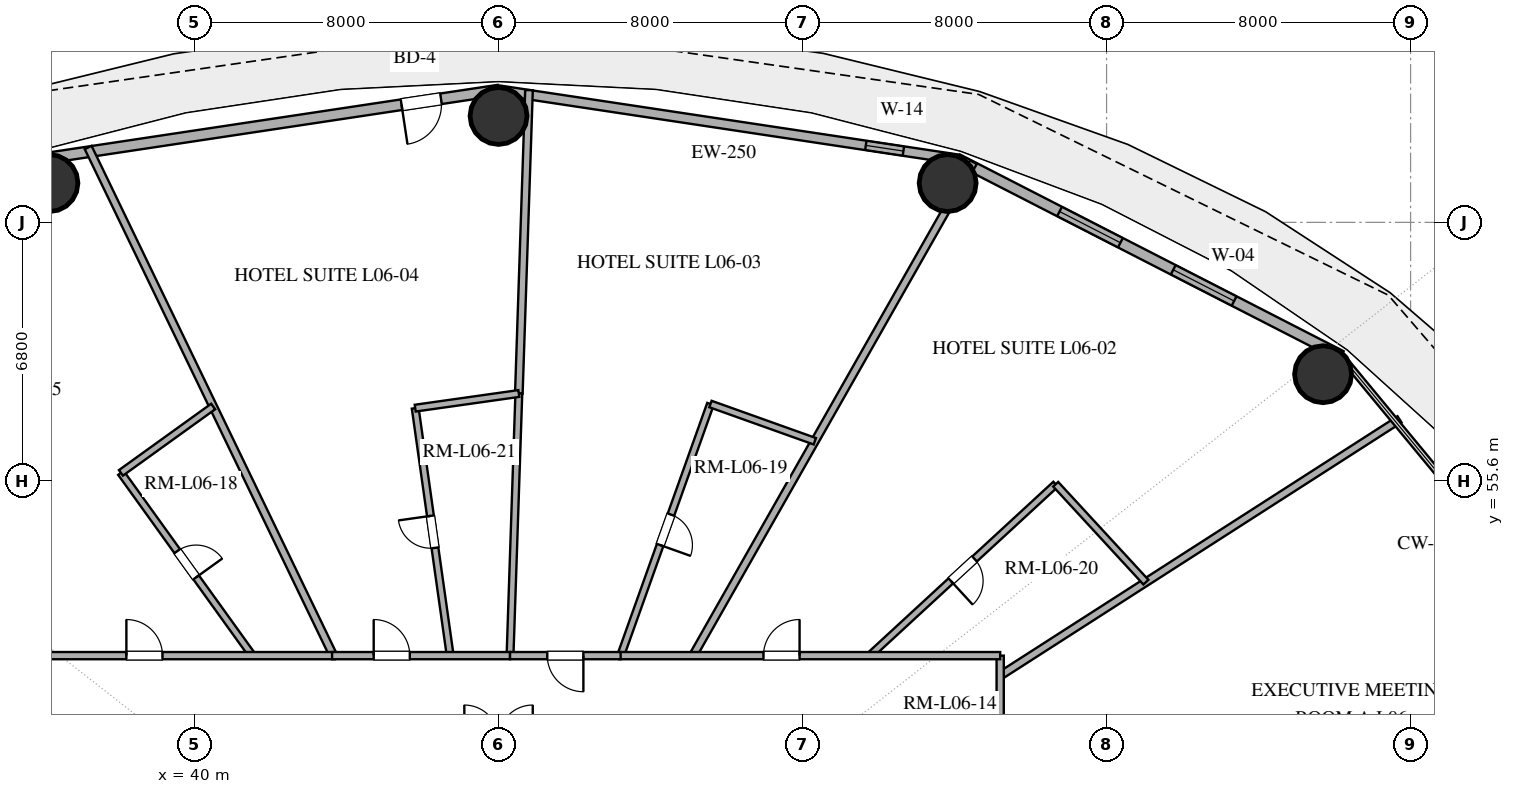
"""IFC4 building model, lengths in metres.
Left out: names, types, materials, properties, quantities, classifications, styles, units other than length and angle.
Written with IfcOpenShell. Run it as: python <this file> out.ifc"""

import sys

from ifc_helpers import new_model, si_unit, direction, frame, frame_2d, origin, origin_2d, place, context, subcontext, project, spatial, rectangle, hollow_circle, extrude, element, fill, save


model = new_model("IFC4")
c1 = context("Model", 3, precision=1e-05, world=origin(), true_north=direction((0.0, 1.0)))
c2 = subcontext(c1, "Body", "Model", "MODEL_VIEW")
j1 = project(units=[si_unit("LENGTHUNIT", "METRE"), si_unit("PLANEANGLEUNIT", "RADIAN")], contexts=[c1])
p1 = place(None, origin())
s1 = spatial("IfcSite", under=j1, at=p1, CompositionType="ELEMENT")
p2 = place(p1, origin())
s2 = spatial("IfcBuilding", under=s1, at=p2, CompositionType="ELEMENT")
p3 = place(p2, frame((0.0, 0.0, 31.8)))
s3 = spatial("IfcBuildingStorey", under=s2, at=p3, CompositionType="ELEMENT", Elevation=31.8)
for number, where, z_axis, x_axis in (
    (1, (69.697, 58.405, 0.0), (0.0, 0.0, 1.0), (1.0, 0.0, 0.0)),
    (2, (59.818, 63.434, 0.0), (0.0, 0.0, 1.0), (1.0, 0.0, 0.0)),
    (3, (48.0, 65.2, 0.0), (0.0, 0.0, 1.0), (1.0, 0.0, 0.0)),
    (4, (36.182, 63.434, 0.0), (0.0, 0.0, 1.0), (1.0, 0.0, 0.0)),
):
    element("IfcColumn", number, at=place(p3, frame(where, z_axis=z_axis, x_axis=x_axis)), inside=s3, PredefinedType="COLUMN", context=c2, shape_type="SweptSolid", body=[
        extrude(hollow_circle(Radius=0.75, WallThickness=0.04, at=origin_2d()), origin(), (0.0, 0.0, 1.0), 3.38),
    ])
p4 = place(p3, frame((70.174, 58.886, 0.0), z_axis=(0.0, 0.0, 1.0), x_axis=(-0.889853976658, 0.456245438581, 0.0)))
e5 = element("IfcWall", 5, at=p4, inside=s3, PredefinedType="SOLIDWALL", context=c2, shape_type="SweptSolid", body=[
    extrude(rectangle(XDim=11.346, YDim=0.28, at=frame_2d((5.673, 0.0))), origin(), (0.0, 0.0, 1.0), 3.38),
])
p5 = place(p4, frame((3.167, 0.0, 0.85)))
e6 = element("IfcOpeningElement", 6, at=p5, cuts=e5, PredefinedType="OPENING", context=c2, shape_type="SweptSolid", body=[
    extrude(rectangle(XDim=1.8, YDim=2.2, at=frame_2d((0.9, 1.1))), frame((0.0, 0.15, 0.0), z_axis=(0.0, -1.0, 0.0), x_axis=(1.0, 0.0, 0.0)), (0.0, 0.0, 1.0), 0.3),
])
p6 = place(p4, frame((6.529, 0.0, 0.85)))
e7 = element("IfcOpeningElement", 7, at=p6, cuts=e5, PredefinedType="OPENING", context=c2, shape_type="SweptSolid", body=[
    extrude(rectangle(XDim=1.8, YDim=2.2, at=frame_2d((0.9, 1.1))), frame((0.0, 0.15, 0.0), z_axis=(0.0, -1.0, 0.0), x_axis=(1.0, 0.0, 0.0)), (0.0, 0.0, 1.0), 0.3),
])
p7 = place(p3, frame((60.078, 64.062, 0.0), z_axis=(0.0, 0.0, 1.0), x_axis=(-0.988864835849, 0.148816452121, 0.0)))
e8 = element("IfcWall", 8, at=p7, inside=s3, PredefinedType="SOLIDWALL", context=c2, shape_type="SweptSolid", body=[
    extrude(rectangle(XDim=12.214, YDim=0.25, at=frame_2d((6.107, 0.0))), origin(), (0.0, 0.0, 1.0), 3.38),
])
p8 = place(p7, frame((1.44, 0.0, 1.42)))
e9 = element("IfcOpeningElement", 9, at=p8, cuts=e8, PredefinedType="OPENING", context=c2, shape_type="SweptSolid", body=[
    extrude(rectangle(XDim=1.0, YDim=1.05, at=frame_2d((0.5, 0.525))), frame((0.0, 0.135, 0.0), z_axis=(0.0, -1.0, 0.0), x_axis=(1.0, 0.0, 0.0)), (0.0, 0.0, 1.0), 0.27),
])
p9 = place(p3, frame((48.0, 65.88, 0.0), z_axis=(0.0, 0.0, 1.0), x_axis=(-0.988864835849, -0.148816452121, 0.0)))
e10 = element("IfcWall", 10, at=p9, inside=s3, PredefinedType="SOLIDWALL", context=c2, shape_type="SweptSolid", body=[
    extrude(rectangle(XDim=12.214, YDim=0.28, at=frame_2d((6.107, 0.0))), origin(), (0.0, 0.0, 1.0), 3.38),
])
p10 = place(p9, frame((1.531, 0.0, 0.0)))
e11 = element("IfcOpeningElement", 11, at=p10, cuts=e10, PredefinedType="OPENING", context=c2, shape_type="SweptSolid", body=[
    extrude(rectangle(XDim=1.05, YDim=2.2, at=frame_2d((0.525, 1.1))), frame((0.0, 0.15, 0.0), z_axis=(0.0, -1.0, 0.0), x_axis=(1.0, 0.0, 0.0)), (0.0, 0.0, 1.0), 0.3),
])
p11 = place(p3, frame((53.116, 51.0, 0.0), z_axis=(0.0, 0.0, 1.0), x_axis=(0.494167535405, 0.869366693031, 0.0)))
e12 = element("IfcWall", 12, at=p11, inside=s3, PredefinedType="PARTITIONING", context=c2, shape_type="SweptSolid", body=[
    extrude(rectangle(XDim=14.934, YDim=0.2, at=frame_2d((7.467, 0.0))), origin(), (0.0, 0.0, 1.0), 2.74),
])
p12 = place(p3, frame((48.802, 65.88, 0.0), z_axis=(0.0, 0.0, 1.0), x_axis=(-0.033562144005, -0.999436632553, 0.0)))
e13 = element("IfcWall", 13, at=p12, inside=s3, PredefinedType="PARTITIONING", context=c2, shape_type="SweptSolid", body=[
    extrude(rectangle(XDim=7.987, YDim=0.2, at=frame_2d((3.994, 0.0))), origin(), (0.0, 0.0, 1.0), 2.74),
])
p13 = place(p3, frame((61.2, 50.472, 0.0), z_axis=(0.0, 0.0, 1.0), x_axis=(0.841576538847, 0.540137879863, 0.0)))
e14 = element("IfcWall", 14, at=p13, inside=s3, PredefinedType="PARTITIONING", context=c2, shape_type="SweptSolid", body=[
    extrude(rectangle(XDim=12.487, YDim=0.2, at=frame_2d((6.244, 0.0))), origin(), (0.0, 0.0, 1.0), 2.74),
])
p14 = place(p3, frame((43.655, 51.0, 0.0), z_axis=(0.0, 0.0, 1.0), x_axis=(-0.434738949034, 0.900556520266, 0.0)))
e15 = element("IfcWall", 15, at=p14, inside=s3, PredefinedType="PARTITIONING", context=c2, shape_type="SweptSolid", body=[
    extrude(rectangle(XDim=14.847, YDim=0.2, at=frame_2d((7.424, 0.0))), origin(), (0.0, 0.0, 1.0), 2.74),
])
p15 = place(p3, frame((61.2, 51.0, 0.0), z_axis=(0.0, 0.0, 1.0), x_axis=(0.0, -1.0, 0.0)))
e16 = element("IfcWall", 16, at=p15, inside=s3, PredefinedType="PARTITIONING", context=c2, shape_type="SweptSolid", body=[
    extrude(rectangle(XDim=14.554, YDim=0.19, at=frame_2d((7.277, 0.0))), origin(), (0.0, 0.0, 1.0), 2.74),
])
p16 = place(p15, frame((3.684, 0.0, 0.0)))
e17 = element("IfcOpeningElement", 17, at=p16, cuts=e16, PredefinedType="OPENING", context=c2, shape_type="SweptSolid", body=[
    extrude(rectangle(XDim=1.0, YDim=2.2, at=frame_2d((0.5, 1.1))), frame((0.0, 0.105, 0.0), z_axis=(0.0, -1.0, 0.0), x_axis=(1.0, 0.0, 0.0)), (0.0, 0.0, 1.0), 0.21),
])
p17 = place(p15, frame((9.438, 0.0, 0.0)))
e18 = element("IfcOpeningElement", 18, at=p17, cuts=e16, PredefinedType="OPENING", context=c2, shape_type="SweptSolid", body=[
    extrude(rectangle(XDim=0.95, YDim=2.15, at=frame_2d((0.475, 1.075))), frame((0.0, 0.105, 0.0), z_axis=(0.0, -1.0, 0.0), x_axis=(1.0, 0.0, 0.0)), (0.0, 0.0, 1.0), 0.21),
])
p18 = place(p3, frame((53.576, 57.621, 0.0), z_axis=(0.0, 0.0, 1.0), x_axis=(-0.336213191961, -0.941785904307, 0.0)))
e19 = element("IfcWall", 19, at=p18, inside=s3, PredefinedType="PLUMBINGWALL", context=c2, shape_type="SweptSolid", body=[
    extrude(rectangle(XDim=7.03, YDim=0.18, at=frame_2d((3.515, 0.0))), origin(), (0.0, 0.0, 1.0), 2.74),
])
p19 = place(p18, frame((3.09, 0.0, 0.0)))
e20 = element("IfcOpeningElement", 20, at=p19, cuts=e19, PredefinedType="OPENING", context=c2, shape_type="SweptSolid", body=[
    extrude(rectangle(XDim=0.85, YDim=2.1, at=frame_2d((0.425, 1.05))), frame((0.0, 0.1, 0.0), z_axis=(0.0, -1.0, 0.0), x_axis=(1.0, 0.0, 0.0)), (0.0, 0.0, 1.0), 0.2),
])
p20 = place(p3, frame((48.534, 57.897, 0.0), z_axis=(0.0, 0.0, 1.0), x_axis=(-0.033537457551, -0.999437461246, 0.0)))
e21 = element("IfcWall", 21, at=p20, inside=s3, PredefinedType="PLUMBINGWALL", context=c2, shape_type="SweptSolid", body=[
    extrude(rectangle(XDim=6.901, YDim=0.18, at=frame_2d((3.451, 0.0))), origin(), (0.0, 0.0, 1.0), 2.74),
])
p21 = place(p3, frame((62.66, 55.51, 0.0), z_axis=(0.0, 0.0, 1.0), x_axis=(-0.735369975398, -0.67766584633, 0.0)))
e22 = element("IfcWall", 22, at=p21, inside=s3, PredefinedType="PLUMBINGWALL", context=c2, shape_type="SweptSolid", body=[
    extrude(rectangle(XDim=6.655, YDim=0.18, at=frame_2d((3.328, 0.0))), origin(), (0.0, 0.0, 1.0), 2.74),
])
p22 = place(p21, frame((2.903, 0.0, 0.0)))
e23 = element("IfcOpeningElement", 23, at=p22, cuts=e22, PredefinedType="OPENING", context=c2, shape_type="SweptSolid", body=[
    extrude(rectangle(XDim=0.85, YDim=2.1, at=frame_2d((0.425, 1.05))), frame((0.0, 0.1, 0.0), z_axis=(0.0, -1.0, 0.0), x_axis=(1.0, 0.0, 0.0)), (0.0, 0.0, 1.0), 0.2),
])
p23 = place(p3, frame((46.728, 51.0, 0.0), z_axis=(0.0, 0.0, 1.0), x_axis=(-0.139991961821, 0.990152640064, 0.0)))
e24 = element("IfcWall", 24, at=p23, inside=s3, PredefinedType="PLUMBINGWALL", context=c2, shape_type="SweptSolid", body=[
    extrude(rectangle(XDim=6.576, YDim=0.18, at=frame_2d((3.288, 0.0))), origin(), (0.0, 0.0, 1.0), 2.74),
])
p24 = place(p23, frame((2.863, 0.0, 0.0)))
e25 = element("IfcOpeningElement", 25, at=p24, cuts=e24, PredefinedType="OPENING", context=c2, shape_type="SweptSolid", body=[
    extrude(rectangle(XDim=0.85, YDim=2.1, at=frame_2d((0.425, 1.05))), frame((0.0, 0.1, 0.0), z_axis=(0.0, -1.0, 0.0), x_axis=(1.0, 0.0, 0.0)), (0.0, 0.0, 1.0), 0.2),
])
p25 = place(p3, frame((38.063, 55.809, 0.0), z_axis=(0.0, 0.0, 1.0), x_axis=(0.584084318507, -0.811692989297, 0.0)))
e26 = element("IfcWall", 26, at=p25, inside=s3, PredefinedType="PLUMBINGWALL", context=c2, shape_type="SweptSolid", body=[
    extrude(rectangle(XDim=5.924, YDim=0.18, at=frame_2d((2.962, 0.0))), origin(), (0.0, 0.0, 1.0), 2.74),
])
p26 = place(p25, frame((2.537, 0.0, 0.0)))
e27 = element("IfcOpeningElement", 27, at=p26, cuts=e26, PredefinedType="OPENING", context=c2, shape_type="SweptSolid", body=[
    extrude(rectangle(XDim=0.85, YDim=2.1, at=frame_2d((0.425, 1.05))), frame((0.0, 0.1, 0.0), z_axis=(0.0, -1.0, 0.0), x_axis=(1.0, 0.0, 0.0)), (0.0, 0.0, 1.0), 0.2),
])
p27 = place(p3, frame((34.8, 51.0, 0.0), z_axis=(0.0, 0.0, 1.0), x_axis=(1.0, 0.0, 0.0)))
e28 = element("IfcWall", 28, at=p27, inside=s3, PredefinedType="PARTITIONING", context=c2, shape_type="SweptSolid", body=[
    extrude(rectangle(XDim=8.891, YDim=0.19, at=frame_2d((4.445, 0.0))), origin(), (0.0, 0.0, 1.0), 2.74),
])
p28 = place(p27, frame((3.407, 0.0, 0.0)))
e29 = element("IfcOpeningElement", 29, at=p28, cuts=e28, PredefinedType="OPENING", context=c2, shape_type="SweptSolid", body=[
    extrude(rectangle(XDim=0.95, YDim=2.15, at=frame_2d((0.475, 1.075))), frame((0.0, 0.105, 0.0), z_axis=(0.0, -1.0, 0.0), x_axis=(1.0, 0.0, 0.0)), (0.0, 0.0, 1.0), 0.21),
])
p29 = place(p3, frame((51.179, 51.0, 0.0), z_axis=(0.0, 0.0, 1.0), x_axis=(1.0, 0.0, 0.0)))
e30 = element("IfcWall", 30, at=p29, inside=s3, PredefinedType="PARTITIONING", context=c2, shape_type="SweptSolid", body=[
    extrude(rectangle(XDim=10.021, YDim=0.19, at=frame_2d((5.01, 0.0))), origin(), (0.0, 0.0, 1.0), 2.74),
])
p30 = place(p29, frame((3.792, 0.0, 0.0)))
e31 = element("IfcOpeningElement", 31, at=p30, cuts=e30, PredefinedType="OPENING", context=c2, shape_type="SweptSolid", body=[
    extrude(rectangle(XDim=0.95, YDim=2.15, at=frame_2d((0.475, 1.075))), frame((0.0, 0.105, 0.0), z_axis=(0.0, -1.0, 0.0), x_axis=(1.0, 0.0, 0.0)), (0.0, 0.0, 1.0), 0.21),
])
p31 = place(p3, frame((65.035, 52.933, 0.0), z_axis=(0.0, 0.0, 1.0), x_axis=(-0.677675106239, 0.735361442002, 0.0)))
e32 = element("IfcWall", 32, at=p31, inside=s3, PredefinedType="PLUMBINGWALL", context=c2, shape_type="SweptSolid", body=[
    extrude(rectangle(XDim=3.504, YDim=0.18, at=frame_2d((1.752, 0.0))), origin(), (0.0, 0.0, 1.0), 2.74),
])
p32 = place(p3, frame((43.62, 51.0, 0.0), z_axis=(0.0, 0.0, 1.0), x_axis=(1.0, 0.0, 0.0)))
e33 = element("IfcWall", 33, at=p32, inside=s3, PredefinedType="PARTITIONING", context=c2, shape_type="SweptSolid", body=[
    extrude(rectangle(XDim=4.683, YDim=0.19, at=frame_2d((2.341, 0.0))), origin(), (0.0, 0.0, 1.0), 2.74),
])
p33 = place(p32, frame((1.095, 0.0, 0.0)))
e34 = element("IfcOpeningElement", 34, at=p33, cuts=e33, PredefinedType="OPENING", context=c2, shape_type="SweptSolid", body=[
    extrude(rectangle(XDim=0.95, YDim=2.15, at=frame_2d((0.475, 1.075))), frame((0.0, 0.105, 0.0), z_axis=(0.0, -1.0, 0.0), x_axis=(1.0, 0.0, 0.0)), (0.0, 0.0, 1.0), 0.21),
])
p34 = place(p3, frame((40.49, 57.555, 0.0), z_axis=(0.0, 0.0, 1.0), x_axis=(-0.811670601443, -0.584115429305, 0.0)))
e35 = element("IfcWall", 35, at=p34, inside=s3, PredefinedType="PLUMBINGWALL", context=c2, shape_type="SweptSolid", body=[
    extrude(rectangle(XDim=2.99, YDim=0.18, at=frame_2d((1.495, 0.0))), origin(), (0.0, 0.0, 1.0), 2.74),
])
p35 = place(p3, frame((56.322, 56.64, 0.0), z_axis=(0.0, 0.0, 1.0), x_axis=(-0.94177979862, 0.336230294457, 0.0)))
e36 = element("IfcWall", 36, at=p35, inside=s3, PredefinedType="PLUMBINGWALL", context=c2, shape_type="SweptSolid", body=[
    extrude(rectangle(XDim=2.915, YDim=0.18, at=frame_2d((1.458, 0.0))), origin(), (0.0, 0.0, 1.0), 2.74),
])
p36 = place(p3, frame((51.213, 51.0, 0.0), z_axis=(0.0, 0.0, 1.0), x_axis=(-1.0, 0.0, 0.0)))
e37 = element("IfcWall", 37, at=p36, inside=s3, PredefinedType="PARTITIONING", context=c2, shape_type="SweptSolid", body=[
    extrude(rectangle(XDim=2.911, YDim=0.19, at=frame_2d((1.455, 0.0))), origin(), (0.0, 0.0, 1.0), 2.74),
])
p37 = place(p36, frame((0.98, 0.0, 0.0)))
e38 = element("IfcOpeningElement", 38, at=p37, cuts=e37, PredefinedType="OPENING", context=c2, shape_type="SweptSolid", body=[
    extrude(rectangle(XDim=0.95, YDim=2.15, at=frame_2d((0.475, 1.075))), frame((0.0, 0.105, 0.0), z_axis=(0.0, -1.0, 0.0), x_axis=(1.0, 0.0, 0.0)), (0.0, 0.0, 1.0), 0.21),
])
p38 = place(p3, frame((45.807, 57.512, 0.0), z_axis=(0.0, 0.0, 1.0), x_axis=(0.990152382036, 0.139993786823, 0.0)))
e39 = element("IfcWall", 39, at=p38, inside=s3, PredefinedType="PLUMBINGWALL", context=c2, shape_type="SweptSolid", body=[
    extrude(rectangle(XDim=2.754, YDim=0.18, at=frame_2d((1.377, 0.0))), origin(), (0.0, 0.0, 1.0), 2.74),
])
p39 = place(p5, origin())
e40 = element("IfcWindow", 40, at=p39, inside=s3, PartitioningType="SINGLE_PANEL", PredefinedType="WINDOW", context=c2, shape_type="SweptSolid", body=[
    extrude(rectangle(XDim=1.8, YDim=2.2, at=frame_2d((0.9, 1.1))), frame((0.0, 0.03, 0.0), z_axis=(0.0, -1.0, 0.0), x_axis=(1.0, 0.0, 0.0)), (0.0, 0.0, 1.0), 0.06),
])
fill(e6, e40)
p40 = place(p6, origin())
e41 = element("IfcWindow", 41, at=p40, inside=s3, PartitioningType="SINGLE_PANEL", PredefinedType="WINDOW", context=c2, shape_type="SweptSolid", body=[
    extrude(rectangle(XDim=1.8, YDim=2.2, at=frame_2d((0.9, 1.1))), frame((0.0, 0.03, 0.0), z_axis=(0.0, -1.0, 0.0), x_axis=(1.0, 0.0, 0.0)), (0.0, 0.0, 1.0), 0.06),
])
fill(e7, e41)
p41 = place(p10, origin())
e42 = element("IfcDoor", 42, at=p41, inside=s3, OperationType="SINGLE_SWING_RIGHT", PredefinedType="DOOR", context=c2, shape_type="SweptSolid", body=[
    extrude(rectangle(XDim=1.05, YDim=2.2, at=frame_2d((0.525, 1.1))), frame((0.0, 0.025, 0.0), z_axis=(0.0, -1.0, 0.0), x_axis=(1.0, 0.0, 0.0)), (0.0, 0.0, 1.0), 0.05),
])
fill(e11, e42)
p42 = place(p8, origin())
e43 = element("IfcWindow", 43, at=p42, inside=s3, PartitioningType="SINGLE_PANEL", PredefinedType="WINDOW", context=c2, shape_type="SweptSolid", body=[
    extrude(rectangle(XDim=1.0, YDim=1.05, at=frame_2d((0.5, 0.525))), frame((0.0, 0.03, 0.0), z_axis=(0.0, -1.0, 0.0), x_axis=(1.0, 0.0, 0.0)), (0.0, 0.0, 1.0), 0.06),
])
fill(e9, e43)
p43 = place(p19, origin())
e44 = element("IfcDoor", 44, at=p43, inside=s3, OperationType="SINGLE_SWING_RIGHT", PredefinedType="DOOR", context=c2, shape_type="SweptSolid", body=[
    extrude(rectangle(XDim=0.85, YDim=2.1, at=frame_2d((0.425, 1.05))), frame((0.0, 0.025, 0.0), z_axis=(0.0, -1.0, 0.0), x_axis=(1.0, 0.0, 0.0)), (0.0, 0.0, 1.0), 0.05),
])
fill(e20, e44)
p44 = place(p22, origin())
e45 = element("IfcDoor", 45, at=p44, inside=s3, OperationType="SINGLE_SWING_RIGHT", PredefinedType="DOOR", context=c2, shape_type="SweptSolid", body=[
    extrude(rectangle(XDim=0.85, YDim=2.1, at=frame_2d((0.425, 1.05))), frame((0.0, 0.025, 0.0), z_axis=(0.0, -1.0, 0.0), x_axis=(1.0, 0.0, 0.0)), (0.0, 0.0, 1.0), 0.05),
])
fill(e23, e45)
p45 = place(p24, origin())
e46 = element("IfcDoor", 46, at=p45, inside=s3, OperationType="SINGLE_SWING_RIGHT", PredefinedType="DOOR", context=c2, shape_type="SweptSolid", body=[
    extrude(rectangle(XDim=0.85, YDim=2.1, at=frame_2d((0.425, 1.05))), frame((0.0, 0.025, 0.0), z_axis=(0.0, -1.0, 0.0), x_axis=(1.0, 0.0, 0.0)), (0.0, 0.0, 1.0), 0.05),
])
fill(e25, e46)
p46 = place(p26, origin())
e47 = element("IfcDoor", 47, at=p46, inside=s3, OperationType="SINGLE_SWING_RIGHT", PredefinedType="DOOR", context=c2, shape_type="SweptSolid", body=[
    extrude(rectangle(XDim=0.85, YDim=2.1, at=frame_2d((0.425, 1.05))), frame((0.0, 0.025, 0.0), z_axis=(0.0, -1.0, 0.0), x_axis=(1.0, 0.0, 0.0)), (0.0, 0.0, 1.0), 0.05),
])
fill(e27, e47)
p47 = place(p28, origin())
e48 = element("IfcDoor", 48, at=p47, inside=s3, OperationType="SINGLE_SWING_LEFT", PredefinedType="DOOR", context=c2, shape_type="SweptSolid", body=[
    extrude(rectangle(XDim=0.95, YDim=2.15, at=frame_2d((0.475, 1.075))), frame((0.0, 0.025, 0.0), z_axis=(0.0, -1.0, 0.0), x_axis=(1.0, 0.0, 0.0)), (0.0, 0.0, 1.0), 0.05),
])
fill(e29, e48)
p48 = place(p30, origin())
e49 = element("IfcDoor", 49, at=p48, inside=s3, OperationType="SINGLE_SWING_RIGHT", PredefinedType="DOOR", context=c2, shape_type="SweptSolid", body=[
    extrude(rectangle(XDim=0.95, YDim=2.15, at=frame_2d((0.475, 1.075))), frame((0.0, 0.025, 0.0), z_axis=(0.0, -1.0, 0.0), x_axis=(1.0, 0.0, 0.0)), (0.0, 0.0, 1.0), 0.05),
])
fill(e31, e49)
p49 = place(p33, origin())
e50 = element("IfcDoor", 50, at=p49, inside=s3, OperationType="SINGLE_SWING_LEFT", PredefinedType="DOOR", context=c2, shape_type="SweptSolid", body=[
    extrude(rectangle(XDim=0.95, YDim=2.15, at=frame_2d((0.475, 1.075))), frame((0.0, 0.025, 0.0), z_axis=(0.0, -1.0, 0.0), x_axis=(1.0, 0.0, 0.0)), (0.0, 0.0, 1.0), 0.05),
])
fill(e34, e50)
p50 = place(p37, origin())
e51 = element("IfcDoor", 51, at=p50, inside=s3, OperationType="SINGLE_SWING_LEFT", PredefinedType="DOOR", context=c2, shape_type="SweptSolid", body=[
    extrude(rectangle(XDim=0.95, YDim=2.15, at=frame_2d((0.475, 1.075))), frame((0.0, 0.025, 0.0), z_axis=(0.0, -1.0, 0.0), x_axis=(1.0, 0.0, 0.0)), (0.0, 0.0, 1.0), 0.05),
])
fill(e38, e51)
save(model, sys.argv[1])
